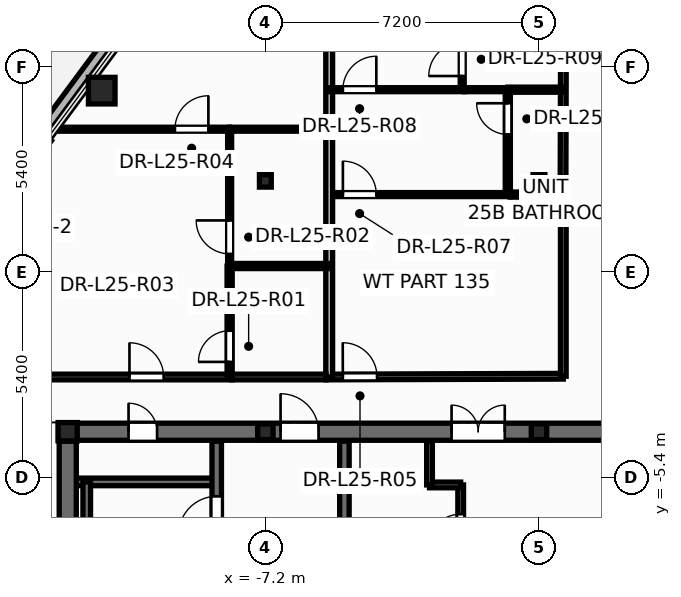
"""IFC4 building model, lengths in metres.
Left out: names, types, materials, properties, quantities, classifications, styles, units other than length and angle.
Written with IfcOpenShell. Run it as: python <this file> out.ifc"""

import sys

from ifc_helpers import new_model, si_unit, direction, frame, frame_2d, origin, origin_2d, place, context, subcontext, project, spatial, rectangle, hollow_circle, i_section, extrude, element, fill, save


model = new_model("IFC4")
c1 = context("Model", 3, precision=1e-05, world=origin(), true_north=direction((0.0, 1.0)))
c2 = subcontext(c1, "Body", "Model", "MODEL_VIEW")
j1 = project(units=[si_unit("LENGTHUNIT", "METRE"), si_unit("PLANEANGLEUNIT", "RADIAN")], contexts=[c1])
p1 = place(None, origin())
s1 = spatial("IfcSite", under=j1, at=p1, CompositionType="ELEMENT")
p2 = place(p1, origin())
s2 = spatial("IfcBuilding", under=s1, at=p2, CompositionType="ELEMENT")
p3 = place(p2, frame((0.0, 0.0, 99.6)))
s3 = spatial("IfcBuildingStorey", under=s2, at=p3, CompositionType="ELEMENT", Elevation=99.6)
p4 = place(p3, frame((-11.506, 4.775, 0.0), z_axis=(0.0, 0.0, 1.0), x_axis=(1.0, 0.0, 0.0)))
e1 = element("IfcColumn", 1, at=p4, inside=s3, PredefinedType="COLUMN", context=c2, shape_type="SweptSolid", body=[
    extrude(hollow_circle(Radius=0.35, WallThickness=0.03, at=origin_2d()), origin(), (0.0, 0.0, 1.0), 3.6),
])
p5 = place(p3, frame((-12.4, -4.2, 0.0), z_axis=(0.0, 0.0, 1.0), x_axis=(1.0, 0.0, 0.0)))
e2 = element("IfcColumn", 2, at=p5, inside=s3, PredefinedType="COLUMN", context=c2, shape_type="SweptSolid", body=[
    extrude(i_section(OverallWidth=0.5, OverallDepth=0.482, WebThickness=0.04, FlangeThickness=0.045, at=origin_2d()), origin(), (0.0, 0.0, 1.0), 3.6),
])
for number, where, z_axis, x_axis in (
    (3, (-7.2, -4.2, 0.0), (0.0, 0.0, 1.0), (1.0, 0.0, 0.0)),
    (4, (0.0, -4.2, 0.0), (0.0, 0.0, 1.0), (1.0, 0.0, 0.0)),
):
    element("IfcColumn", number, at=place(p3, frame(where, z_axis=z_axis, x_axis=x_axis)), inside=s3, PredefinedType="PILASTER", context=c2, shape_type="SweptSolid", body=[
        extrude(i_section(OverallWidth=0.405, OverallDepth=0.414, WebThickness=0.022, FlangeThickness=0.032, at=origin_2d()), origin(), (0.0, 0.0, 1.0), 3.6),
    ])
for number, where, z_axis, x_axis in (
    (5, (-7.2, 2.4, 0.0), (0.0, 0.0, 1.0), (1.0, 0.0, 0.0)),
    (6, (0.0, 2.4, 0.0), (0.0, 0.0, 1.0), (1.0, 0.0, 0.0)),
):
    element("IfcColumn", number, at=place(p3, frame(where, z_axis=z_axis, x_axis=x_axis)), inside=s3, PredefinedType="COLUMN", context=c2, shape_type="SweptSolid", body=[
        extrude(i_section(OverallWidth=0.311, OverallDepth=0.327, WebThickness=0.016, FlangeThickness=0.025, at=origin_2d()), origin(), (0.0, 0.0, 1.0), 3.6),
    ])
p6 = place(p3, frame((-6.292, 12.761, -0.2), z_axis=(0.0, 0.0, 1.0), x_axis=(-0.594907064231, -0.803794491725, 0.0)))
e7 = element("IfcWall", 7, at=p6, inside=s3, PredefinedType="PARAPET", context=c2, shape_type="SweptSolid", body=[
    extrude(rectangle(XDim=11.279, YDim=0.36, at=frame_2d((5.639, 0.0))), origin(), (0.0, 0.0, 1.0), 0.38),
])
p7 = place(p3, frame((-2.06, -7.9, 0.0), z_axis=(0.0, 0.0, 1.0), x_axis=(0.0, 1.0, 0.0)))
e8 = element("IfcWall", 8, at=p7, inside=s3, PredefinedType="PARTITIONING", context=c2, shape_type="SweptSolid", body=[
    extrude(rectangle(XDim=2.3, YDim=0.15, at=frame_2d((1.15, 0.0))), origin(), (0.0, 0.0, 1.0), 3.35),
])
p8 = place(p7, frame((0.65, 0.0, 0.0)))
e9 = element("IfcOpeningElement", 9, at=p8, cuts=e8, PredefinedType="OPENING", context=c2, shape_type="SweptSolid", body=[
    extrude(rectangle(XDim=0.886, YDim=2.104, at=frame_2d((0.44, 1.052))), frame((0.0, 0.085, 0.0), z_axis=(0.0, -1.0, 0.0), x_axis=(1.0, 0.0, 0.0)), (0.0, 0.0, 1.0), 0.17),
])
p9 = place(p3, frame((-2.88, -5.6, 0.0), z_axis=(0.0, 0.0, 1.0), x_axis=(1.0, 0.0, 0.0)))
e10 = element("IfcWall", 10, at=p9, inside=s3, PredefinedType="PARTITIONING", context=c2, shape_type="SweptSolid", body=[
    extrude(rectangle(XDim=0.82, YDim=0.15, at=frame_2d((0.41, 0.0))), origin(), (0.0, 0.0, 1.0), 3.35),
])
p10 = place(p3, frame((-2.88, -5.6, 0.0), z_axis=(0.0, 0.0, 1.0), x_axis=(0.0, 1.0, 0.0)))
e11 = element("IfcWall", 11, at=p10, inside=s3, PredefinedType="PARTITIONING", context=c2, shape_type="SweptSolid", body=[
    extrude(rectangle(XDim=1.15, YDim=0.15, at=frame_2d((0.575, 0.0))), origin(), (0.0, 0.0, 1.0), 3.35),
])
p11 = place(p3, frame((-12.65, -4.2, 0.0), z_axis=(0.0, 0.0, 1.0), x_axis=(1.0, 0.0, 0.0)))
e12 = element("IfcWall", 12, at=p11, inside=s3, PredefinedType="SHEAR", context=c2, shape_type="SweptSolid", body=[
    extrude(rectangle(XDim=25.3, YDim=0.45, at=frame_2d((12.65, 0.0))), origin(), (0.0, 0.0, 1.0), 3.6),
])
p12 = place(p11, frame((1.85, 0.0, 0.0)))
e13 = element("IfcOpeningElement", 13, at=p12, cuts=e12, PredefinedType="OPENING", context=c2, shape_type="SweptSolid", body=[
    extrude(rectangle(XDim=0.756, YDim=2.054, at=frame_2d((0.375, 1.027))), frame((0.0, 0.235, 0.0), z_axis=(0.0, -1.0, 0.0), x_axis=(1.0, 0.0, 0.0)), (0.0, 0.0, 1.0), 0.47),
])
p13 = place(p11, frame((21.85, 0.0, 0.0)))
e14 = element("IfcOpeningElement", 14, at=p13, cuts=e12, PredefinedType="OPENING", context=c2, shape_type="SweptSolid", body=[
    extrude(rectangle(XDim=0.756, YDim=2.054, at=frame_2d((0.375, 1.027))), frame((0.0, 0.235, 0.0), z_axis=(0.0, -1.0, 0.0), x_axis=(1.0, 0.0, 0.0)), (0.0, 0.0, 1.0), 0.47),
])
p14 = place(p11, frame((23.5, 0.0, 0.0)))
e15 = element("IfcOpeningElement", 15, at=p14, cuts=e12, PredefinedType="OPENING", context=c2, shape_type="SweptSolid", body=[
    extrude(rectangle(XDim=0.756, YDim=2.054, at=frame_2d((0.375, 1.027))), frame((0.0, 0.235, 0.0), z_axis=(0.0, -1.0, 0.0), x_axis=(1.0, 0.0, 0.0)), (0.0, 0.0, 1.0), 0.47),
])
p15 = place(p11, frame((5.85, 0.0, 0.0)))
e16 = element("IfcOpeningElement", 16, at=p15, cuts=e12, PredefinedType="OPENING", context=c2, shape_type="SweptSolid", body=[
    extrude(rectangle(XDim=1.006, YDim=2.104, at=frame_2d((0.5, 1.052))), frame((0.0, 0.235, 0.0), z_axis=(0.0, -1.0, 0.0), x_axis=(1.0, 0.0, 0.0)), (0.0, 0.0, 1.0), 0.47),
])
p16 = place(p11, frame((10.35, 0.0, 0.0)))
e17 = element("IfcOpeningElement", 17, at=p16, cuts=e12, PredefinedType="OPENING", context=c2, shape_type="SweptSolid", body=[
    extrude(rectangle(XDim=1.406, YDim=2.154, at=frame_2d((0.7, 1.077))), frame((0.0, 0.235, 0.0), z_axis=(0.0, -1.0, 0.0), x_axis=(1.0, 0.0, 0.0)), (0.0, 0.0, 1.0), 0.47),
])
p17 = place(p11, frame((18.45, 0.0, 0.0)))
e18 = element("IfcOpeningElement", 18, at=p17, cuts=e12, PredefinedType="OPENING", context=c2, shape_type="SweptSolid", body=[
    extrude(rectangle(XDim=1.006, YDim=2.104, at=frame_2d((0.5, 1.052))), frame((0.0, 0.235, 0.0), z_axis=(0.0, -1.0, 0.0), x_axis=(1.0, 0.0, 0.0)), (0.0, 0.0, 1.0), 0.47),
])
p18 = place(p3, frame((-12.35, -5.52, 0.0), z_axis=(0.0, 0.0, 1.0), x_axis=(1.0, 0.0, 0.0)))
e19 = element("IfcWall", 19, at=p18, inside=s3, PredefinedType="SOLIDWALL", context=c2, shape_type="SweptSolid", body=[
    extrude(rectangle(XDim=3.87, YDim=0.2, at=frame_2d((1.935, 0.0))), origin(), (0.0, 0.0, 1.0), 3.6),
])
p19 = place(p3, frame((-11.9, -13.1, 0.0), z_axis=(0.0, 0.0, 1.0), x_axis=(0.0, 1.0, 0.0)))
e20 = element("IfcWall", 20, at=p19, inside=s3, PredefinedType="SOLIDWALL", context=c2, shape_type="SweptSolid", body=[
    extrude(rectangle(XDim=7.58, YDim=0.2, at=frame_2d((3.79, 0.0))), origin(), (0.0, 0.0, 1.0), 3.6),
])
p20 = place(p3, frame((-8.48, -13.85, 0.0), z_axis=(0.0, 0.0, 1.0), x_axis=(0.0, 1.0, 0.0)))
e21 = element("IfcWall", 21, at=p20, inside=s3, PredefinedType="SHEAR", context=c2, shape_type="SweptSolid", body=[
    extrude(rectangle(XDim=9.4, YDim=0.25, at=frame_2d((4.7, 0.0))), origin(), (0.0, 0.0, 1.0), 3.6),
])
p21 = place(p20, frame((6.95, 0.0, 0.0)))
e22 = element("IfcOpeningElement", 22, at=p21, cuts=e21, PredefinedType="OPENING", context=c2, shape_type="SweptSolid", body=[
    extrude(rectangle(XDim=1.006, YDim=2.104, at=frame_2d((0.5, 1.052))), frame((0.0, 0.135, 0.0), z_axis=(0.0, -1.0, 0.0), x_axis=(1.0, 0.0, 0.0)), (0.0, 0.0, 1.0), 0.27),
])
p22 = place(p3, frame((-5.12, -13.85, 0.0), z_axis=(0.0, 0.0, 1.0), x_axis=(0.0, 1.0, 0.0)))
e23 = element("IfcWall", 23, at=p22, inside=s3, PredefinedType="SHEAR", context=c2, shape_type="SweptSolid", body=[
    extrude(rectangle(XDim=9.4, YDim=0.25, at=frame_2d((4.7, 0.0))), origin(), (0.0, 0.0, 1.0), 3.6),
])
p23 = place(p3, frame((-12.4, -13.85, 0.0), z_axis=(0.0, 0.0, 1.0), x_axis=(0.0, 1.0, 0.0)))
e24 = element("IfcWall", 24, at=p23, inside=s3, PredefinedType="SHEAR", context=c2, shape_type="SweptSolid", body=[
    extrude(rectangle(XDim=9.4, YDim=0.45, at=frame_2d((4.7, 0.0))), origin(), (0.0, 0.0, 1.0), 3.6),
])
p24 = place(p3, frame((-17.58, -2.76, 0.0), z_axis=(0.0, 0.0, 1.0), x_axis=(1.0, 0.0, 0.0)))
e25 = element("IfcWall", 25, at=p24, inside=s3, PredefinedType="PARTITIONING", context=c2, shape_type="SweptSolid", body=[
    extrude(rectangle(XDim=9.5, YDim=0.15, at=frame_2d((4.75, 0.0))), origin(), (0.0, 0.0, 1.0), 2.713),
])
p25 = place(p24, frame((6.804, 0.0, 0.0)))
e26 = element("IfcOpeningElement", 26, at=p25, cuts=e25, PredefinedType="OPENING", context=c2, shape_type="SweptSolid", body=[
    extrude(rectangle(XDim=0.906, YDim=2.104, at=frame_2d((0.45, 1.052))), frame((0.0, 0.085, 0.0), z_axis=(0.0, -1.0, 0.0), x_axis=(1.0, 0.0, 0.0)), (0.0, 0.0, 1.0), 0.17),
])
p26 = place(p3, frame((0.632, 1.98, 0.0), z_axis=(0.0, 0.0, 1.0), x_axis=(0.002830348232, 0.999995994556, 0.0)))
e27 = element("IfcWall", 27, at=p26, inside=s3, PredefinedType="PARTITIONING", context=c2, shape_type="SweptSolid", body=[
    extrude(rectangle(XDim=10.782, YDim=0.15, at=frame_2d((5.391, 0.0))), origin(), (0.0, 0.0, 1.0), 2.325),
])
p27 = place(p3, frame((-5.52, 3.76, 0.0), z_axis=(0.0, 0.0, 1.0), x_axis=(0.0, 1.0, 0.0)))
e28 = element("IfcWall", 28, at=p27, inside=s3, PredefinedType="PARTITIONING", context=c2, shape_type="SweptSolid", body=[
    extrude(rectangle(XDim=9.002, YDim=0.18, at=frame_2d((4.501, 0.0))), origin(), (0.0, 0.0, 1.0), 2.617),
])
p28 = place(p3, frame((-2.02, 4.8, 0.0), z_axis=(0.0, 0.0, 1.0), x_axis=(0.0, 1.0, 0.0)))
e29 = element("IfcWall", 29, at=p28, inside=s3, PredefinedType="PARTITIONING", context=c2, shape_type="SweptSolid", body=[
    extrude(rectangle(XDim=7.962, YDim=0.105, at=frame_2d((3.981, 0.0))), origin(), (0.0, 0.0, 1.0), 2.617),
])
p29 = place(p28, frame((0.359, 0.0, 0.0)))
e30 = element("IfcOpeningElement", 30, at=p29, cuts=e29, PredefinedType="OPENING", context=c2, shape_type="SweptSolid", body=[
    extrude(rectangle(XDim=0.886, YDim=2.104, at=frame_2d((0.44, 1.052))), frame((0.0, 0.062, 0.0), z_axis=(0.0, -1.0, 0.0), x_axis=(1.0, 0.0, 0.0)), (0.0, 0.0, 1.0), 0.125),
])
p30 = place(p3, frame((-5.6, -2.76, 0.0), z_axis=(0.0, 0.0, 1.0), x_axis=(0.999994853563, 0.003208246723, 0.0)))
e31 = element("IfcWall", 31, at=p30, inside=s3, PredefinedType="PARTITIONING", context=c2, shape_type="SweptSolid", body=[
    extrude(rectangle(XDim=6.24, YDim=0.15, at=frame_2d((3.12, 0.0))), origin(), (0.0, 0.0, 1.0), 2.325),
])
p31 = place(p30, frame((0.439, 0.0, 0.0)))
e32 = element("IfcOpeningElement", 32, at=p31, cuts=e31, PredefinedType="OPENING", context=c2, shape_type="SweptSolid", body=[
    extrude(rectangle(XDim=0.906, YDim=2.104, at=frame_2d((0.45, 1.052))), frame((0.0, 0.085, 0.0), z_axis=(0.0, -1.0, 0.0), x_axis=(1.0, 0.0, 0.0)), (0.0, 0.0, 1.0), 0.17),
])
p32 = place(p3, frame((0.64, -2.74, 0.0), z_axis=(0.0, 0.0, 1.0), x_axis=(0.0, 1.0, 0.0)))
e33 = element("IfcWall", 33, at=p32, inside=s3, PredefinedType="PARTITIONING", context=c2, shape_type="SweptSolid", body=[
    extrude(rectangle(XDim=4.718, YDim=0.15, at=frame_2d((2.359, 0.0))), origin(), (0.0, 0.0, 1.0), 3.35),
])
p33 = place(p3, frame((-5.52, 2.04, 0.0), z_axis=(0.0, 0.0, 1.0), x_axis=(1.0, 0.0, 0.0)))
e34 = element("IfcWall", 34, at=p33, inside=s3, PredefinedType="PARTITIONING", context=c2, shape_type="SweptSolid", body=[
    extrude(rectangle(XDim=4.76, YDim=0.105, at=frame_2d((2.38, 0.0))), origin(), (0.0, 0.0, 1.0), 2.918),
])
p34 = place(p33, frame((0.36, 0.0, 0.0)))
e35 = element("IfcOpeningElement", 35, at=p34, cuts=e34, PredefinedType="OPENING", context=c2, shape_type="SweptSolid", body=[
    extrude(rectangle(XDim=0.886, YDim=2.104, at=frame_2d((0.44, 1.052))), frame((0.0, 0.062, 0.0), z_axis=(0.0, -1.0, 0.0), x_axis=(1.0, 0.0, 0.0)), (0.0, 0.0, 1.0), 0.125),
])
p35 = place(p3, frame((-12.754, 3.76, 0.0), z_axis=(0.0, 0.0, 1.0), x_axis=(1.0, 0.0, 0.0)))
e36 = element("IfcWall", 36, at=p35, inside=s3, PredefinedType="PARTITIONING", context=c2, shape_type="SweptSolid", body=[
    extrude(rectangle(XDim=4.615, YDim=0.105, at=frame_2d((2.307, 0.0))), origin(), (0.0, 0.0, 1.0), 2.713),
])
p36 = place(p35, frame((3.175, 0.0, 0.0)))
e37 = element("IfcOpeningElement", 37, at=p36, cuts=e36, PredefinedType="OPENING", context=c2, shape_type="SweptSolid", body=[
    extrude(rectangle(XDim=0.886, YDim=2.104, at=frame_2d((0.44, 1.052))), frame((0.0, 0.062, 0.0), z_axis=(0.0, -1.0, 0.0), x_axis=(1.0, 0.0, 0.0)), (0.0, 0.0, 1.0), 0.125),
])
p37 = place(p3, frame((-8.14, 0.16, 0.0), z_axis=(0.0, 0.0, 1.0), x_axis=(0.0, 1.0, 0.0)))
e38 = element("IfcWall", 38, at=p37, inside=s3, PredefinedType="PARTITIONING", context=c2, shape_type="SweptSolid", body=[
    extrude(rectangle(XDim=3.6, YDim=0.105, at=frame_2d((1.8, 0.0))), origin(), (0.0, 0.0, 1.0), 2.617),
])
p38 = place(p37, frame((0.32, 0.0, 0.0)))
e39 = element("IfcOpeningElement", 39, at=p38, cuts=e38, PredefinedType="OPENING", context=c2, shape_type="SweptSolid", body=[
    extrude(rectangle(XDim=0.886, YDim=2.104, at=frame_2d((0.44, 1.052))), frame((0.0, 0.062, 0.0), z_axis=(0.0, -1.0, 0.0), x_axis=(1.0, 0.0, 0.0)), (0.0, 0.0, 1.0), 0.125),
])
p39 = place(p3, frame((-5.52, 4.8, 0.0), z_axis=(0.0, 0.0, 1.0), x_axis=(1.0, 0.0, 0.0)))
e40 = element("IfcWall", 40, at=p39, inside=s3, PredefinedType="PARTITIONING", context=c2, shape_type="SweptSolid", body=[
    extrude(rectangle(XDim=3.56, YDim=0.105, at=frame_2d((1.78, 0.0))), origin(), (0.0, 0.0, 1.0), 2.918),
])
p40 = place(p39, frame((0.36, 0.0, 0.0)))
e41 = element("IfcOpeningElement", 41, at=p40, cuts=e40, PredefinedType="OPENING", context=c2, shape_type="SweptSolid", body=[
    extrude(rectangle(XDim=0.886, YDim=2.104, at=frame_2d((0.44, 1.052))), frame((0.0, 0.062, 0.0), z_axis=(0.0, -1.0, 0.0), x_axis=(1.0, 0.0, 0.0)), (0.0, 0.0, 1.0), 0.125),
])
p41 = place(p3, frame((-8.14, -2.76, 0.0), z_axis=(0.0, 0.0, 1.0), x_axis=(0.0, 1.0, 0.0)))
e42 = element("IfcWall", 42, at=p41, inside=s3, PredefinedType="PARTITIONING", context=c2, shape_type="SweptSolid", body=[
    extrude(rectangle(XDim=2.92, YDim=0.135, at=frame_2d((1.46, 0.0))), origin(), (0.0, 0.0, 1.0), 3.35),
])
p42 = place(p41, frame((0.397, 0.0, 0.0)))
e43 = element("IfcOpeningElement", 43, at=p42, cuts=e42, PredefinedType="OPENING", context=c2, shape_type="SweptSolid", body=[
    extrude(rectangle(XDim=0.826, YDim=2.104, at=frame_2d((0.41, 1.052))), frame((0.0, 0.078, 0.0), z_axis=(0.0, -1.0, 0.0), x_axis=(1.0, 0.0, 0.0)), (0.0, 0.0, 1.0), 0.155),
])
p43 = place(p3, frame((-5.52, -2.76, 0.0), z_axis=(0.0, 0.0, 1.0), x_axis=(0.0, 1.0, 0.0)))
e44 = element("IfcWall", 44, at=p43, inside=s3, PredefinedType="PARTITIONING", context=c2, shape_type="SweptSolid", body=[
    extrude(rectangle(XDim=6.52, YDim=0.18, at=frame_2d((3.26, 0.0))), origin(), (0.0, 0.0, 1.0), 2.325),
])
p44 = place(p3, frame((-0.82, 2.04, 0.0), z_axis=(0.0, 0.0, 1.0), x_axis=(0.0, 1.0, 0.0)))
e45 = element("IfcWall", 45, at=p44, inside=s3, PredefinedType="PARTITIONING", context=c2, shape_type="SweptSolid", body=[
    extrude(rectangle(XDim=2.76, YDim=0.135, at=frame_2d((1.38, 0.0))), origin(), (0.0, 0.0, 1.0), 2.325),
])
p45 = place(p44, frame((1.583, 0.0, 0.0)))
e46 = element("IfcOpeningElement", 46, at=p45, cuts=e45, PredefinedType="OPENING", context=c2, shape_type="SweptSolid", body=[
    extrude(rectangle(XDim=0.826, YDim=2.104, at=frame_2d((0.41, 1.052))), frame((0.0, 0.078, 0.0), z_axis=(0.0, -1.0, 0.0), x_axis=(1.0, 0.0, 0.0)), (0.0, 0.0, 1.0), 0.155),
])
p46 = place(p3, frame((-8.078, -2.76, 0.0), z_axis=(0.0, 0.0, 1.0), x_axis=(1.0, 0.0, 0.0)))
e47 = element("IfcWall", 47, at=p46, inside=s3, PredefinedType="PARTITIONING", context=c2, shape_type="SweptSolid", body=[
    extrude(rectangle(XDim=2.476, YDim=0.15, at=frame_2d((1.238, 0.0))), origin(), (0.0, 0.0, 1.0), 2.325),
])
p47 = place(p3, frame((-8.14, 0.16, 0.0), z_axis=(0.0, 0.0, 1.0), x_axis=(1.0, 0.0, 0.0)))
e48 = element("IfcWall", 48, at=p47, inside=s3, PredefinedType="PARTITIONING", context=c2, shape_type="SweptSolid", body=[
    extrude(rectangle(XDim=2.62, YDim=0.135, at=frame_2d((1.31, 0.0))), origin(), (0.0, 0.0, 1.0), 2.325),
])
p48 = place(p3, frame((-8.14, 3.76, 0.0), z_axis=(0.0, 0.0, 1.0), x_axis=(1.0, 0.0, 0.0)))
e49 = element("IfcWall", 49, at=p48, inside=s3, PredefinedType="PARTITIONING", context=c2, shape_type="SweptSolid", body=[
    extrude(rectangle(XDim=2.62, YDim=0.105, at=frame_2d((1.31, 0.0))), origin(), (0.0, 0.0, 1.0), 2.617),
])
p49 = place(p3, frame((-0.758, 2.04, 0.0), z_axis=(0.0, 0.0, 1.0), x_axis=(1.0, 0.0, 0.0)))
e50 = element("IfcWall", 50, at=p49, inside=s3, PredefinedType="PARTITIONING", context=c2, shape_type="SweptSolid", body=[
    extrude(rectangle(XDim=1.398, YDim=0.135, at=frame_2d((0.699, 0.0))), origin(), (0.0, 0.0, 1.0), 2.325),
])
p50 = place(p3, frame((-0.82, 4.8, 0.0), z_axis=(0.0, 0.0, 1.0), x_axis=(1.0, 0.0, 0.0)))
e51 = element("IfcWall", 51, at=p50, inside=s3, PredefinedType="PARTITIONING", context=c2, shape_type="SweptSolid", body=[
    extrude(rectangle(XDim=1.46, YDim=0.135, at=frame_2d((0.73, 0.0))), origin(), (0.0, 0.0, 1.0), 2.325),
])
p51 = place(p3, frame((-1.958, 4.8, 0.0), z_axis=(0.0, 0.0, 1.0), x_axis=(1.0, 0.0, 0.0)))
e52 = element("IfcWall", 52, at=p51, inside=s3, PredefinedType="PARTITIONING", context=c2, shape_type="SweptSolid", body=[
    extrude(rectangle(XDim=1.138, YDim=0.105, at=frame_2d((0.569, 0.0))), origin(), (0.0, 0.0, 1.0), 3.35),
])
p52 = place(p8, origin())
e53 = element("IfcDoor", 53, at=p52, inside=s3, OperationType="SINGLE_SWING_LEFT", PredefinedType="DOOR", context=c2, shape_type="SweptSolid", body=[
    extrude(rectangle(XDim=0.88, YDim=2.1, at=frame_2d((0.44, 1.05))), frame((0.0, 0.025, 0.0), z_axis=(0.0, -1.0, 0.0), x_axis=(1.0, 0.0, 0.0)), (0.0, 0.0, 1.0), 0.05),
])
fill(e9, e53)
p53 = place(p21, origin())
e54 = element("IfcDoor", 54, at=p53, inside=s3, OperationType="SINGLE_SWING_LEFT", PredefinedType="DOOR", context=c2, shape_type="SweptSolid", body=[
    extrude(rectangle(XDim=1.0, YDim=2.1, at=frame_2d((0.5, 1.05))), frame((0.0, 0.025, 0.0), z_axis=(0.0, -1.0, 0.0), x_axis=(1.0, 0.0, 0.0)), (0.0, 0.0, 1.0), 0.05),
])
fill(e22, e54)
p54 = place(p12, origin())
e55 = element("IfcDoor", 55, at=p54, inside=s3, OperationType="SINGLE_SWING_LEFT", PredefinedType="DOOR", context=c2, shape_type="SweptSolid", body=[
    extrude(rectangle(XDim=0.75, YDim=2.05, at=frame_2d((0.375, 1.025))), frame((0.0, 0.025, 0.0), z_axis=(0.0, -1.0, 0.0), x_axis=(1.0, 0.0, 0.0)), (0.0, 0.0, 1.0), 0.05),
])
fill(e13, e55)
p55 = place(p15, origin())
e56 = element("IfcDoor", 56, at=p55, inside=s3, OperationType="SINGLE_SWING_LEFT", PredefinedType="DOOR", context=c2, shape_type="SweptSolid", body=[
    extrude(rectangle(XDim=1.0, YDim=2.1, at=frame_2d((0.5, 1.05))), frame((0.0, 0.025, 0.0), z_axis=(0.0, -1.0, 0.0), x_axis=(1.0, 0.0, 0.0)), (0.0, 0.0, 1.0), 0.05),
])
fill(e16, e56)
p56 = place(p16, origin())
e57 = element("IfcDoor", 57, at=p56, inside=s3, OperationType="DOUBLE_DOOR_SINGLE_SWING", PredefinedType="DOOR", context=c2, shape_type="SweptSolid", body=[
    extrude(rectangle(XDim=1.4, YDim=2.15, at=frame_2d((0.7, 1.075))), frame((0.0, 0.025, 0.0), z_axis=(0.0, -1.0, 0.0), x_axis=(1.0, 0.0, 0.0)), (0.0, 0.0, 1.0), 0.05),
])
fill(e17, e57)
p57 = place(p42, origin())
e58 = element("IfcDoor", 58, at=p57, inside=s3, OperationType="SINGLE_SWING_LEFT", PredefinedType="DOOR", context=c2, shape_type="SweptSolid", body=[
    extrude(rectangle(XDim=0.82, YDim=2.1, at=frame_2d((0.41, 1.05))), frame((0.0, 0.025, 0.0), z_axis=(0.0, -1.0, 0.0), x_axis=(1.0, 0.0, 0.0)), (0.0, 0.0, 1.0), 0.05),
])
fill(e43, e58)
p58 = place(p38, origin())
e59 = element("IfcDoor", 59, at=p58, inside=s3, OperationType="SINGLE_SWING_RIGHT", PredefinedType="DOOR", context=c2, shape_type="SweptSolid", body=[
    extrude(rectangle(XDim=0.88, YDim=2.1, at=frame_2d((0.44, 1.05))), frame((0.0, 0.025, 0.0), z_axis=(0.0, -1.0, 0.0), x_axis=(1.0, 0.0, 0.0)), (0.0, 0.0, 1.0), 0.05),
])
fill(e39, e59)
p59 = place(p25, origin())
e60 = element("IfcDoor", 60, at=p59, inside=s3, OperationType="SINGLE_SWING_LEFT", PredefinedType="DOOR", context=c2, shape_type="SweptSolid", body=[
    extrude(rectangle(XDim=0.9, YDim=2.1, at=frame_2d((0.45, 1.05))), frame((0.0, 0.025, 0.0), z_axis=(0.0, -1.0, 0.0), x_axis=(1.0, 0.0, 0.0)), (0.0, 0.0, 1.0), 0.05),
])
fill(e26, e60)
p60 = place(p36, origin())
e61 = element("IfcDoor", 61, at=p60, inside=s3, OperationType="SINGLE_SWING_RIGHT", PredefinedType="DOOR", context=c2, shape_type="SweptSolid", body=[
    extrude(rectangle(XDim=0.88, YDim=2.1, at=frame_2d((0.44, 1.05))), frame((0.0, 0.025, 0.0), z_axis=(0.0, -1.0, 0.0), x_axis=(1.0, 0.0, 0.0)), (0.0, 0.0, 1.0), 0.05),
])
fill(e37, e61)
p61 = place(p31, origin())
e62 = element("IfcDoor", 62, at=p61, inside=s3, OperationType="SINGLE_SWING_LEFT", PredefinedType="DOOR", context=c2, shape_type="SweptSolid", body=[
    extrude(rectangle(XDim=0.9, YDim=2.1, at=frame_2d((0.45, 1.05))), frame((0.0, 0.025, 0.0), z_axis=(0.0, -1.0, 0.0), x_axis=(1.0, 0.0, 0.0)), (0.0, 0.0, 1.0), 0.05),
])
fill(e32, e62)
p62 = place(p45, origin())
e63 = element("IfcDoor", 63, at=p62, inside=s3, OperationType="SINGLE_SWING_RIGHT", PredefinedType="DOOR", context=c2, shape_type="SweptSolid", body=[
    extrude(rectangle(XDim=0.82, YDim=2.1, at=frame_2d((0.41, 1.05))), frame((0.0, 0.025, 0.0), z_axis=(0.0, -1.0, 0.0), x_axis=(1.0, 0.0, 0.0)), (0.0, 0.0, 1.0), 0.05),
])
fill(e46, e63)
p63 = place(p34, origin())
e64 = element("IfcDoor", 64, at=p63, inside=s3, OperationType="SINGLE_SWING_LEFT", PredefinedType="DOOR", context=c2, shape_type="SweptSolid", body=[
    extrude(rectangle(XDim=0.88, YDim=2.1, at=frame_2d((0.44, 1.05))), frame((0.0, 0.025, 0.0), z_axis=(0.0, -1.0, 0.0), x_axis=(1.0, 0.0, 0.0)), (0.0, 0.0, 1.0), 0.05),
])
fill(e35, e64)
p64 = place(p40, origin())
e65 = element("IfcDoor", 65, at=p64, inside=s3, OperationType="SINGLE_SWING_RIGHT", PredefinedType="DOOR", context=c2, shape_type="SweptSolid", body=[
    extrude(rectangle(XDim=0.88, YDim=2.1, at=frame_2d((0.44, 1.05))), frame((0.0, 0.025, 0.0), z_axis=(0.0, -1.0, 0.0), x_axis=(1.0, 0.0, 0.0)), (0.0, 0.0, 1.0), 0.05),
])
fill(e41, e65)
p65 = place(p29, origin())
e66 = element("IfcDoor", 66, at=p65, inside=s3, OperationType="SINGLE_SWING_LEFT", PredefinedType="DOOR", context=c2, shape_type="SweptSolid", body=[
    extrude(rectangle(XDim=0.88, YDim=2.1, at=frame_2d((0.44, 1.05))), frame((0.0, 0.025, 0.0), z_axis=(0.0, -1.0, 0.0), x_axis=(1.0, 0.0, 0.0)), (0.0, 0.0, 1.0), 0.05),
])
fill(e30, e66)
save(model, sys.argv[1])
